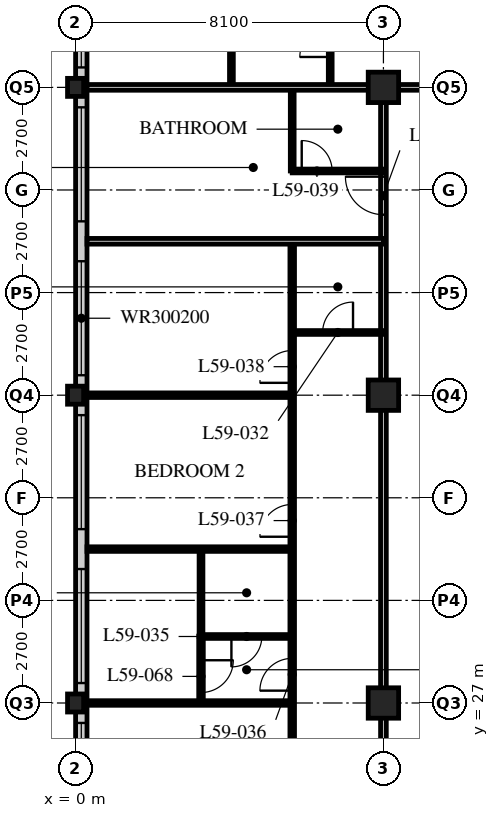
"""IFC4 building model, lengths in metres.
Left out: names, types, materials, properties, quantities, classifications, styles, units other than length and angle.
Written with IfcOpenShell. Run it as: python <this file> out.ifc"""

import sys

from ifc_helpers import new_model, si_unit, direction, frame, frame_2d, origin, origin_2d, place, context, subcontext, project, spatial, rectangle, hollow_rectangle, i_section, extrude, element, fill, save


model = new_model("IFC4")
c1 = context("Model", 3, precision=1e-05, world=origin(), true_north=direction((0.0, 1.0)))
c2 = subcontext(c1, "Body", "Model", "MODEL_VIEW")
j1 = project(units=[si_unit("LENGTHUNIT", "METRE"), si_unit("PLANEANGLEUNIT", "RADIAN")], contexts=[c1])
p1 = place(None, origin())
s1 = spatial("IfcSite", under=j1, at=p1, CompositionType="ELEMENT")
p2 = place(p1, origin())
s2 = spatial("IfcBuilding", under=s1, at=p2, CompositionType="ELEMENT")
p3 = place(p2, frame((0.0, 0.0, 228.0)))
s3 = spatial("IfcBuildingStorey", under=s2, at=p3, CompositionType="ELEMENT", Elevation=228.0)
for number, where, z_axis, x_axis in (
    (1, (0.0, 27.0, 0.0), (0.0, 0.0, 1.0), (1.0, 0.0, 0.0)),
    (2, (0.0, 35.1, 0.0), (0.0, 0.0, 1.0), (1.0, 0.0, 0.0)),
    (3, (0.0, 43.2, 0.0), (0.0, 0.0, 1.0), (1.0, 0.0, 0.0)),
):
    element("IfcColumn", number, at=place(p3, frame(where, z_axis=z_axis, x_axis=x_axis)), inside=s3, PredefinedType="COLUMN", context=c2, shape_type="SweptSolid", body=[
        extrude(i_section(OverallWidth=0.424, OverallDepth=0.475, WebThickness=0.048, FlangeThickness=0.077, FilletRadius=0.015, at=origin_2d()), origin(), (0.0, 0.0, 1.0), 3.6),
    ])
for number, where, z_axis, x_axis in (
    (4, (8.1, 27.0, 0.0), (0.0, 0.0, 1.0), (1.0, 0.0, 0.0)),
    (5, (8.1, 35.1, 0.0), (0.0, 0.0, 1.0), (1.0, 0.0, 0.0)),
    (6, (8.1, 43.2, 0.0), (0.0, 0.0, 1.0), (1.0, 0.0, 0.0)),
):
    element("IfcColumn", number, at=place(p3, frame(where, z_axis=z_axis, x_axis=x_axis)), inside=s3, PredefinedType="COLUMN", context=c2, shape_type="SweptSolid", body=[
        extrude(hollow_rectangle(XDim=0.8, YDim=0.8, WallThickness=0.08, at=origin_2d()), origin(), (0.0, 0.0, 1.0), 3.6),
    ])
p4 = place(p3, frame((0.15, 51.0, 0.0), z_axis=(0.0, 0.0, 1.0), x_axis=(0.0, -1.0, 0.0)))
e7 = element("IfcWall", 7, at=p4, inside=s3, PredefinedType="SOLIDWALL", context=c2, shape_type="SweptSolid", body=[
    extrude(rectangle(XDim=32.1, YDim=0.3, at=frame_2d((16.05, 0.0))), origin(), (0.0, 0.0, 1.0), 3.39),
])
p5 = place(p4, frame((0.225, 0.0, 0.6)))
e8 = element("IfcOpeningElement", 8, at=p5, cuts=e7, PredefinedType="OPENING", context=c2, shape_type="SweptSolid", body=[
    extrude(rectangle(XDim=3.0, YDim=2.0, at=frame_2d((1.5, 1.0))), frame((0.0, 0.16, 0.0), z_axis=(0.0, -1.0, 0.0), x_axis=(1.0, 0.0, 0.0)), (0.0, 0.0, 1.0), 0.32),
])
p6 = place(p4, frame((4.275, 0.0, 0.6)))
e9 = element("IfcOpeningElement", 9, at=p6, cuts=e7, PredefinedType="OPENING", context=c2, shape_type="SweptSolid", body=[
    extrude(rectangle(XDim=3.0, YDim=2.0, at=frame_2d((1.5, 1.0))), frame((0.0, 0.16, 0.0), z_axis=(0.0, -1.0, 0.0), x_axis=(1.0, 0.0, 0.0)), (0.0, 0.0, 1.0), 0.32),
])
p7 = place(p4, frame((8.325, 0.0, 0.6)))
e10 = element("IfcOpeningElement", 10, at=p7, cuts=e7, PredefinedType="OPENING", context=c2, shape_type="SweptSolid", body=[
    extrude(rectangle(XDim=3.0, YDim=2.0, at=frame_2d((1.5, 1.0))), frame((0.0, 0.16, 0.0), z_axis=(0.0, -1.0, 0.0), x_axis=(1.0, 0.0, 0.0)), (0.0, 0.0, 1.0), 0.32),
])
p8 = place(p4, frame((12.375, 0.0, 0.6)))
e11 = element("IfcOpeningElement", 11, at=p8, cuts=e7, PredefinedType="OPENING", context=c2, shape_type="SweptSolid", body=[
    extrude(rectangle(XDim=3.0, YDim=2.0, at=frame_2d((1.5, 1.0))), frame((0.0, 0.16, 0.0), z_axis=(0.0, -1.0, 0.0), x_axis=(1.0, 0.0, 0.0)), (0.0, 0.0, 1.0), 0.32),
])
p9 = place(p4, frame((16.425, 0.0, 0.6)))
e12 = element("IfcOpeningElement", 12, at=p9, cuts=e7, PredefinedType="OPENING", context=c2, shape_type="SweptSolid", body=[
    extrude(rectangle(XDim=3.0, YDim=2.0, at=frame_2d((1.5, 1.0))), frame((0.0, 0.16, 0.0), z_axis=(0.0, -1.0, 0.0), x_axis=(1.0, 0.0, 0.0)), (0.0, 0.0, 1.0), 0.32),
])
p10 = place(p4, frame((20.475, 0.0, 0.6)))
e13 = element("IfcOpeningElement", 13, at=p10, cuts=e7, PredefinedType="OPENING", context=c2, shape_type="SweptSolid", body=[
    extrude(rectangle(XDim=3.0, YDim=2.0, at=frame_2d((1.5, 1.0))), frame((0.0, 0.16, 0.0), z_axis=(0.0, -1.0, 0.0), x_axis=(1.0, 0.0, 0.0)), (0.0, 0.0, 1.0), 0.32),
])
p11 = place(p4, frame((24.525, 0.0, 0.6)))
e14 = element("IfcOpeningElement", 14, at=p11, cuts=e7, PredefinedType="OPENING", context=c2, shape_type="SweptSolid", body=[
    extrude(rectangle(XDim=3.0, YDim=2.0, at=frame_2d((1.5, 1.0))), frame((0.0, 0.16, 0.0), z_axis=(0.0, -1.0, 0.0), x_axis=(1.0, 0.0, 0.0)), (0.0, 0.0, 1.0), 0.32),
])
p12 = place(p4, frame((28.575, 0.0, 0.6)))
e15 = element("IfcOpeningElement", 15, at=p12, cuts=e7, PredefinedType="OPENING", context=c2, shape_type="SweptSolid", body=[
    extrude(rectangle(XDim=3.0, YDim=2.0, at=frame_2d((1.5, 1.0))), frame((0.0, 0.16, 0.0), z_axis=(0.0, -1.0, 0.0), x_axis=(1.0, 0.0, 0.0)), (0.0, 0.0, 1.0), 0.32),
])
p13 = place(p3, frame((8.1, 43.2, 0.0), z_axis=(0.0, 0.0, 1.0), x_axis=(1.0, 0.0, 0.0)))
e16 = element("IfcWall", 16, at=p13, inside=s3, PredefinedType="PARTITIONING", context=c2, shape_type="SweptSolid", body=[
    extrude(rectangle(XDim=36.45, YDim=0.15, at=frame_2d((18.225, 0.0))), origin(), (0.0, 0.0, 1.0), 2.628),
])
p14 = place(p13, frame((4.45, 0.0, 0.0)))
e17 = element("IfcOpeningElement", 17, at=p14, cuts=e16, PredefinedType="OPENING", context=c2, shape_type="SweptSolid", body=[
    extrude(rectangle(XDim=1.0, YDim=2.1, at=frame_2d((0.5, 1.05))), frame((0.0, 0.085, 0.0), z_axis=(0.0, -1.0, 0.0), x_axis=(1.0, 0.0, 0.0)), (0.0, 0.0, 1.0), 0.17),
])
p15 = place(p13, frame((17.1, 0.0, 0.0)))
e18 = element("IfcOpeningElement", 18, at=p15, cuts=e16, PredefinedType="OPENING", context=c2, shape_type="SweptSolid", body=[
    extrude(rectangle(XDim=1.0, YDim=2.1, at=frame_2d((0.5, 1.05))), frame((0.0, 0.085, 0.0), z_axis=(0.0, -1.0, 0.0), x_axis=(1.0, 0.0, 0.0)), (0.0, 0.0, 1.0), 0.17),
])
p16 = place(p13, frame((29.05, 0.0, 0.0)))
e19 = element("IfcOpeningElement", 19, at=p16, cuts=e16, PredefinedType="OPENING", context=c2, shape_type="SweptSolid", body=[
    extrude(rectangle(XDim=1.0, YDim=2.1, at=frame_2d((0.5, 1.05))), frame((0.0, 0.085, 0.0), z_axis=(0.0, -1.0, 0.0), x_axis=(1.0, 0.0, 0.0)), (0.0, 0.0, 1.0), 0.17),
])
p17 = place(p13, frame((33.925, 0.0, 0.0)))
e20 = element("IfcOpeningElement", 20, at=p17, cuts=e16, PredefinedType="OPENING", context=c2, shape_type="SweptSolid", body=[
    extrude(rectangle(XDim=1.0, YDim=2.1, at=frame_2d((0.5, 1.05))), frame((0.0, 0.085, 0.0), z_axis=(0.0, -1.0, 0.0), x_axis=(1.0, 0.0, 0.0)), (0.0, 0.0, 1.0), 0.17),
])
p18 = place(p13, frame((1.525, 0.0, 0.0)))
e21 = element("IfcOpeningElement", 21, at=p18, cuts=e16, PredefinedType="OPENING", context=c2, shape_type="SweptSolid", body=[
    extrude(rectangle(XDim=1.0, YDim=2.1, at=frame_2d((0.5, 1.05))), frame((0.0, 0.085, 0.0), z_axis=(0.0, -1.0, 0.0), x_axis=(1.0, 0.0, 0.0)), (0.0, 0.0, 1.0), 0.17),
])
p19 = place(p3, frame((8.1, 18.9, 0.0), z_axis=(0.0, 0.0, 1.0), x_axis=(0.0, 1.0, 0.0)))
e22 = element("IfcWall", 22, at=p19, inside=s3, PredefinedType="PARTITIONING", context=c2, shape_type="SweptSolid", body=[
    extrude(rectangle(XDim=24.3, YDim=0.15, at=frame_2d((12.15, 0.0))), origin(), (0.0, 0.0, 1.0), 2.628),
])
p20 = place(p19, frame((0.9, 0.0, 0.0)))
e23 = element("IfcOpeningElement", 23, at=p20, cuts=e22, PredefinedType="OPENING", context=c2, shape_type="SweptSolid", body=[
    extrude(rectangle(XDim=1.0, YDim=2.1, at=frame_2d((0.5, 1.05))), frame((0.0, 0.085, 0.0), z_axis=(0.0, -1.0, 0.0), x_axis=(1.0, 0.0, 0.0)), (0.0, 0.0, 1.0), 0.17),
])
p21 = place(p19, frame((20.95, 0.0, 0.0)))
e24 = element("IfcOpeningElement", 24, at=p21, cuts=e22, PredefinedType="OPENING", context=c2, shape_type="SweptSolid", body=[
    extrude(rectangle(XDim=1.0, YDim=2.1, at=frame_2d((0.5, 1.05))), frame((0.0, 0.085, 0.0), z_axis=(0.0, -1.0, 0.0), x_axis=(1.0, 0.0, 0.0)), (0.0, 0.0, 1.0), 0.17),
])
p22 = place(p3, frame((5.7, 18.9, 0.0), z_axis=(0.0, 0.0, 1.0), x_axis=(0.0, 1.0, 0.0)))
e25 = element("IfcWall", 25, at=p22, inside=s3, PredefinedType="PARTITIONING", context=c2, shape_type="SweptSolid", body=[
    extrude(rectangle(XDim=20.25, YDim=0.12, at=frame_2d((10.125, 0.0))), origin(), (0.0, 0.0, 1.0), 3.39),
])
p23 = place(p22, frame((0.975, 0.0, 0.0)))
e26 = element("IfcOpeningElement", 26, at=p23, cuts=e25, PredefinedType="OPENING", context=c2, shape_type="SweptSolid", body=[
    extrude(rectangle(XDim=0.85, YDim=2.1, at=frame_2d((0.425, 1.05))), frame((0.0, 0.07, 0.0), z_axis=(0.0, -1.0, 0.0), x_axis=(1.0, 0.0, 0.0)), (0.0, 0.0, 1.0), 0.14),
])
p24 = place(p22, frame((8.425, 0.0, 0.0)))
e27 = element("IfcOpeningElement", 27, at=p24, cuts=e25, PredefinedType="OPENING", context=c2, shape_type="SweptSolid", body=[
    extrude(rectangle(XDim=0.85, YDim=2.1, at=frame_2d((0.425, 1.05))), frame((0.0, 0.07, 0.0), z_axis=(0.0, -1.0, 0.0), x_axis=(1.0, 0.0, 0.0)), (0.0, 0.0, 1.0), 0.14),
])
p25 = place(p22, frame((12.475, 0.0, 0.0)))
e28 = element("IfcOpeningElement", 28, at=p25, cuts=e25, PredefinedType="OPENING", context=c2, shape_type="SweptSolid", body=[
    extrude(rectangle(XDim=0.85, YDim=2.1, at=frame_2d((0.425, 1.05))), frame((0.0, 0.07, 0.0), z_axis=(0.0, -1.0, 0.0), x_axis=(1.0, 0.0, 0.0)), (0.0, 0.0, 1.0), 0.14),
])
p26 = place(p22, frame((16.525, 0.0, 0.0)))
e29 = element("IfcOpeningElement", 29, at=p26, cuts=e25, PredefinedType="OPENING", context=c2, shape_type="SweptSolid", body=[
    extrude(rectangle(XDim=0.85, YDim=2.1, at=frame_2d((0.425, 1.05))), frame((0.0, 0.07, 0.0), z_axis=(0.0, -1.0, 0.0), x_axis=(1.0, 0.0, 0.0)), (0.0, 0.0, 1.0), 0.14),
])
p27 = place(p3, frame((8.1, 36.75, 0.0), z_axis=(0.0, 0.0, 1.0), x_axis=(-1.0, 0.0, 0.0)))
e30 = element("IfcWall", 30, at=p27, inside=s3, PredefinedType="PARTITIONING", context=c2, shape_type="SweptSolid", body=[
    extrude(rectangle(XDim=2.4, YDim=0.1, at=frame_2d((1.2, 0.0))), origin(), (0.0, 0.0, 1.0), 3.39),
])
p28 = place(p27, frame((0.8, 0.0, 0.0)))
e31 = element("IfcOpeningElement", 31, at=p28, cuts=e30, PredefinedType="OPENING", context=c2, shape_type="SweptSolid", body=[
    extrude(rectangle(XDim=0.8, YDim=2.1, at=frame_2d((0.4, 1.05))), frame((0.0, 0.06, 0.0), z_axis=(0.0, -1.0, 0.0), x_axis=(1.0, 0.0, 0.0)), (0.0, 0.0, 1.0), 0.12),
])
p29 = place(p3, frame((5.7, 28.75, 0.0), z_axis=(0.0, 0.0, 1.0), x_axis=(-1.0, 0.0, 0.0)))
e32 = element("IfcWall", 32, at=p29, inside=s3, PredefinedType="PARTITIONING", context=c2, shape_type="SweptSolid", body=[
    extrude(rectangle(XDim=2.4, YDim=0.1, at=frame_2d((1.2, 0.0))), origin(), (0.0, 0.0, 1.0), 3.39),
])
p30 = place(p29, frame((0.8, 0.0, 0.0)))
e33 = element("IfcOpeningElement", 33, at=p30, cuts=e32, PredefinedType="OPENING", context=c2, shape_type="SweptSolid", body=[
    extrude(rectangle(XDim=0.8, YDim=2.1, at=frame_2d((0.4, 1.05))), frame((0.0, 0.06, 0.0), z_axis=(0.0, -1.0, 0.0), x_axis=(1.0, 0.0, 0.0)), (0.0, 0.0, 1.0), 0.12),
])
p31 = place(p3, frame((3.3, 28.75, 0.0), z_axis=(0.0, 0.0, 1.0), x_axis=(0.0, 1.0, 0.0)))
e34 = element("IfcWall", 34, at=p31, inside=s3, PredefinedType="PARTITIONING", context=c2, shape_type="SweptSolid", body=[
    extrude(rectangle(XDim=2.3, YDim=0.1, at=frame_2d((1.15, 0.0))), origin(), (0.0, 0.0, 1.0), 3.39),
])
p32 = place(p3, frame((5.7, 27.0, 0.0), z_axis=(0.0, 0.0, 1.0), x_axis=(-1.0, 0.0, 0.0)))
e35 = element("IfcWall", 35, at=p32, inside=s3, PredefinedType="PARTITIONING", context=c2, shape_type="SweptSolid", body=[
    extrude(rectangle(XDim=5.4, YDim=0.12, at=frame_2d((2.7, 0.0))), origin(), (0.0, 0.0, 1.0), 2.628),
])
p33 = place(p3, frame((5.7, 31.05, 0.0), z_axis=(0.0, 0.0, 1.0), x_axis=(-1.0, 0.0, 0.0)))
e36 = element("IfcWall", 36, at=p33, inside=s3, PredefinedType="PARTITIONING", context=c2, shape_type="SweptSolid", body=[
    extrude(rectangle(XDim=5.4, YDim=0.12, at=frame_2d((2.7, 0.0))), origin(), (0.0, 0.0, 1.0), 3.39),
])
p34 = place(p3, frame((5.7, 35.1, 0.0), z_axis=(0.0, 0.0, 1.0), x_axis=(-1.0, 0.0, 0.0)))
e37 = element("IfcWall", 37, at=p34, inside=s3, PredefinedType="PARTITIONING", context=c2, shape_type="SweptSolid", body=[
    extrude(rectangle(XDim=5.4, YDim=0.12, at=frame_2d((2.7, 0.0))), origin(), (0.0, 0.0, 1.0), 2.628),
])
p35 = place(p3, frame((8.1, 39.15, 0.0), z_axis=(0.0, 0.0, 1.0), x_axis=(-1.0, 0.0, 0.0)))
e38 = element("IfcWall", 38, at=p35, inside=s3, PredefinedType="PARTITIONING", context=c2, shape_type="SweptSolid", body=[
    extrude(rectangle(XDim=7.8, YDim=0.15, at=frame_2d((3.9, 0.0))), origin(), (0.0, 0.0, 1.0), 3.39),
])
p36 = place(p3, frame((5.7, 41.0, 0.0), z_axis=(0.0, 0.0, 1.0), x_axis=(0.0, 1.0, 0.0)))
e39 = element("IfcWall", 39, at=p36, inside=s3, PredefinedType="PARTITIONING", context=c2, shape_type="SweptSolid", body=[
    extrude(rectangle(XDim=2.2, YDim=0.1, at=frame_2d((1.1, 0.0))), origin(), (0.0, 0.0, 1.0), 3.39),
])
p37 = place(p3, frame((8.1, 41.0, 0.0), z_axis=(0.0, 0.0, 1.0), x_axis=(-1.0, 0.0, 0.0)))
e40 = element("IfcWall", 40, at=p37, inside=s3, PredefinedType="PARTITIONING", context=c2, shape_type="SweptSolid", body=[
    extrude(rectangle(XDim=2.4, YDim=0.1, at=frame_2d((1.2, 0.0))), origin(), (0.0, 0.0, 1.0), 3.39),
])
p38 = place(p37, frame((1.35, 0.0, 0.0)))
e41 = element("IfcOpeningElement", 41, at=p38, cuts=e40, PredefinedType="OPENING", context=c2, shape_type="SweptSolid", body=[
    extrude(rectangle(XDim=0.8, YDim=2.1, at=frame_2d((0.4, 1.05))), frame((0.0, 0.06, 0.0), z_axis=(0.0, -1.0, 0.0), x_axis=(1.0, 0.0, 0.0)), (0.0, 0.0, 1.0), 0.12),
])
p39 = place(p3, frame((6.7, 43.2, 0.0), z_axis=(0.0, 0.0, 1.0), x_axis=(0.0, 1.0, 0.0)))
e42 = element("IfcWall", 42, at=p39, inside=s3, PredefinedType="PARTITIONING", context=c2, shape_type="SweptSolid", body=[
    extrude(rectangle(XDim=2.4, YDim=0.1, at=frame_2d((1.2, 0.0))), origin(), (0.0, 0.0, 1.0), 3.39),
])
p40 = place(p39, frame((0.8, 0.0, 0.0)))
e43 = element("IfcOpeningElement", 43, at=p40, cuts=e42, PredefinedType="OPENING", context=c2, shape_type="SweptSolid", body=[
    extrude(rectangle(XDim=0.8, YDim=2.1, at=frame_2d((0.4, 1.05))), frame((0.0, 0.06, 0.0), z_axis=(0.0, -1.0, 0.0), x_axis=(1.0, 0.0, 0.0)), (0.0, 0.0, 1.0), 0.12),
])
p41 = place(p3, frame((4.1, 43.2, 0.0), z_axis=(0.0, 0.0, 1.0), x_axis=(0.0, 1.0, 0.0)))
e44 = element("IfcWall", 44, at=p41, inside=s3, PredefinedType="PARTITIONING", context=c2, shape_type="SweptSolid", body=[
    extrude(rectangle(XDim=2.4, YDim=0.1, at=frame_2d((1.2, 0.0))), origin(), (0.0, 0.0, 1.0), 3.39),
])
p42 = place(p3, frame((0.3, 43.2, 0.0), z_axis=(0.0, 0.0, 1.0), x_axis=(1.0, 0.0, 0.0)))
e45 = element("IfcWall", 45, at=p42, inside=s3, PredefinedType="PARTITIONING", context=c2, shape_type="SweptSolid", body=[
    extrude(rectangle(XDim=7.8, YDim=0.15, at=frame_2d((3.9, 0.0))), origin(), (0.0, 0.0, 1.0), 2.628),
])
p43 = place(p3, frame((3.3, 27.0, 0.0), z_axis=(0.0, 0.0, 1.0), x_axis=(0.0, 1.0, 0.0)))
e46 = element("IfcWall", 46, at=p43, inside=s3, PredefinedType="PARTITIONING", context=c2, shape_type="SweptSolid", body=[
    extrude(rectangle(XDim=1.76, YDim=0.12, at=frame_2d((0.88, 0.0))), origin(), (0.0, 0.0, 1.0), 3.39),
])
p44 = place(p43, frame((0.275, 0.0, 0.0)))
e47 = element("IfcOpeningElement", 47, at=p44, cuts=e46, PredefinedType="OPENING", context=c2, shape_type="SweptSolid", body=[
    extrude(rectangle(XDim=0.85, YDim=2.1, at=frame_2d((0.425, 1.05))), frame((0.0, 0.07, 0.0), z_axis=(0.0, -1.0, 0.0), x_axis=(1.0, 0.0, 0.0)), (0.0, 0.0, 1.0), 0.14),
])
p45 = place(p6, origin())
e48 = element("IfcWindow", 48, at=p45, inside=s3, PartitioningType="SINGLE_PANEL", PredefinedType="WINDOW", context=c2, shape_type="SweptSolid", body=[
    extrude(rectangle(XDim=3.0, YDim=2.0, at=frame_2d((1.5, 1.0))), frame((0.0, 0.03, 0.0), z_axis=(0.0, -1.0, 0.0), x_axis=(1.0, 0.0, 0.0)), (0.0, 0.0, 1.0), 0.06),
])
fill(e9, e48)
p46 = place(p7, origin())
e49 = element("IfcWindow", 49, at=p46, inside=s3, PartitioningType="SINGLE_PANEL", PredefinedType="WINDOW", context=c2, shape_type="SweptSolid", body=[
    extrude(rectangle(XDim=3.0, YDim=2.0, at=frame_2d((1.5, 1.0))), frame((0.0, 0.03, 0.0), z_axis=(0.0, -1.0, 0.0), x_axis=(1.0, 0.0, 0.0)), (0.0, 0.0, 1.0), 0.06),
])
fill(e10, e49)
p47 = place(p8, origin())
e50 = element("IfcWindow", 50, at=p47, inside=s3, PartitioningType="SINGLE_PANEL", PredefinedType="WINDOW", context=c2, shape_type="SweptSolid", body=[
    extrude(rectangle(XDim=3.0, YDim=2.0, at=frame_2d((1.5, 1.0))), frame((0.0, 0.03, 0.0), z_axis=(0.0, -1.0, 0.0), x_axis=(1.0, 0.0, 0.0)), (0.0, 0.0, 1.0), 0.06),
])
fill(e11, e50)
p48 = place(p9, origin())
e51 = element("IfcWindow", 51, at=p48, inside=s3, PartitioningType="SINGLE_PANEL", PredefinedType="WINDOW", context=c2, shape_type="SweptSolid", body=[
    extrude(rectangle(XDim=3.0, YDim=2.0, at=frame_2d((1.5, 1.0))), frame((0.0, 0.03, 0.0), z_axis=(0.0, -1.0, 0.0), x_axis=(1.0, 0.0, 0.0)), (0.0, 0.0, 1.0), 0.06),
])
fill(e12, e51)
p49 = place(p10, origin())
e52 = element("IfcWindow", 52, at=p49, inside=s3, PartitioningType="SINGLE_PANEL", PredefinedType="WINDOW", context=c2, shape_type="SweptSolid", body=[
    extrude(rectangle(XDim=3.0, YDim=2.0, at=frame_2d((1.5, 1.0))), frame((0.0, 0.03, 0.0), z_axis=(0.0, -1.0, 0.0), x_axis=(1.0, 0.0, 0.0)), (0.0, 0.0, 1.0), 0.06),
])
fill(e13, e52)
p50 = place(p11, origin())
e53 = element("IfcWindow", 53, at=p50, inside=s3, PartitioningType="SINGLE_PANEL", PredefinedType="WINDOW", context=c2, shape_type="SweptSolid", body=[
    extrude(rectangle(XDim=3.0, YDim=2.0, at=frame_2d((1.5, 1.0))), frame((0.0, 0.03, 0.0), z_axis=(0.0, -1.0, 0.0), x_axis=(1.0, 0.0, 0.0)), (0.0, 0.0, 1.0), 0.06),
])
fill(e14, e53)
p51 = place(p28, origin())
e54 = element("IfcDoor", 54, at=p51, inside=s3, OperationType="SINGLE_SWING_RIGHT", PredefinedType="DOOR", context=c2, shape_type="SweptSolid", body=[
    extrude(rectangle(XDim=0.8, YDim=2.1, at=frame_2d((0.4, 1.05))), frame((0.0, 0.025, 0.0), z_axis=(0.0, -1.0, 0.0), x_axis=(1.0, 0.0, 0.0)), (0.0, 0.0, 1.0), 0.05),
])
fill(e31, e54)
p52 = place(p30, origin())
e55 = element("IfcDoor", 55, at=p52, inside=s3, OperationType="SINGLE_SWING_RIGHT", PredefinedType="DOOR", context=c2, shape_type="SweptSolid", body=[
    extrude(rectangle(XDim=0.8, YDim=2.1, at=frame_2d((0.4, 1.05))), frame((0.0, 0.025, 0.0), z_axis=(0.0, -1.0, 0.0), x_axis=(1.0, 0.0, 0.0)), (0.0, 0.0, 1.0), 0.05),
])
fill(e33, e55)
p53 = place(p24, origin())
e56 = element("IfcDoor", 56, at=p53, inside=s3, OperationType="SINGLE_SWING_LEFT", PredefinedType="DOOR", context=c2, shape_type="SweptSolid", body=[
    extrude(rectangle(XDim=0.85, YDim=2.1, at=frame_2d((0.425, 1.05))), frame((0.0, 0.025, 0.0), z_axis=(0.0, -1.0, 0.0), x_axis=(1.0, 0.0, 0.0)), (0.0, 0.0, 1.0), 0.05),
])
fill(e27, e56)
p54 = place(p25, origin())
e57 = element("IfcDoor", 57, at=p54, inside=s3, OperationType="SINGLE_SWING_LEFT", PredefinedType="DOOR", context=c2, shape_type="SweptSolid", body=[
    extrude(rectangle(XDim=0.85, YDim=2.1, at=frame_2d((0.425, 1.05))), frame((0.0, 0.025, 0.0), z_axis=(0.0, -1.0, 0.0), x_axis=(1.0, 0.0, 0.0)), (0.0, 0.0, 1.0), 0.05),
])
fill(e28, e57)
p55 = place(p26, origin())
e58 = element("IfcDoor", 58, at=p55, inside=s3, OperationType="SINGLE_SWING_LEFT", PredefinedType="DOOR", context=c2, shape_type="SweptSolid", body=[
    extrude(rectangle(XDim=0.85, YDim=2.1, at=frame_2d((0.425, 1.05))), frame((0.0, 0.025, 0.0), z_axis=(0.0, -1.0, 0.0), x_axis=(1.0, 0.0, 0.0)), (0.0, 0.0, 1.0), 0.05),
])
fill(e29, e58)
p56 = place(p38, origin())
e59 = element("IfcDoor", 59, at=p56, inside=s3, OperationType="SINGLE_SWING_LEFT", PredefinedType="DOOR", context=c2, shape_type="SweptSolid", body=[
    extrude(rectangle(XDim=0.8, YDim=2.1, at=frame_2d((0.4, 1.05))), frame((0.0, 0.025, 0.0), z_axis=(0.0, -1.0, 0.0), x_axis=(1.0, 0.0, 0.0)), (0.0, 0.0, 1.0), 0.05),
])
fill(e41, e59)
p57 = place(p21, origin())
e60 = element("IfcDoor", 60, at=p57, inside=s3, OperationType="SINGLE_SWING_RIGHT", PredefinedType="DOOR", context=c2, shape_type="SweptSolid", body=[
    extrude(rectangle(XDim=1.0, YDim=2.1, at=frame_2d((0.5, 1.05))), frame((0.0, 0.025, 0.0), z_axis=(0.0, -1.0, 0.0), x_axis=(1.0, 0.0, 0.0)), (0.0, 0.0, 1.0), 0.05),
])
fill(e24, e60)
p58 = place(p40, origin())
e61 = element("IfcDoor", 61, at=p58, inside=s3, OperationType="SINGLE_SWING_LEFT", PredefinedType="DOOR", context=c2, shape_type="SweptSolid", body=[
    extrude(rectangle(XDim=0.8, YDim=2.1, at=frame_2d((0.4, 1.05))), frame((0.0, 0.025, 0.0), z_axis=(0.0, -1.0, 0.0), x_axis=(1.0, 0.0, 0.0)), (0.0, 0.0, 1.0), 0.05),
])
fill(e43, e61)
p59 = place(p44, origin())
e62 = element("IfcDoor", 62, at=p59, inside=s3, OperationType="SINGLE_SWING_LEFT", PredefinedType="DOOR", context=c2, shape_type="SweptSolid", body=[
    extrude(rectangle(XDim=0.85, YDim=2.1, at=frame_2d((0.425, 1.05))), frame((0.0, 0.025, 0.0), z_axis=(0.0, -1.0, 0.0), x_axis=(1.0, 0.0, 0.0)), (0.0, 0.0, 1.0), 0.05),
])
fill(e47, e62)
save(model, sys.argv[1])
